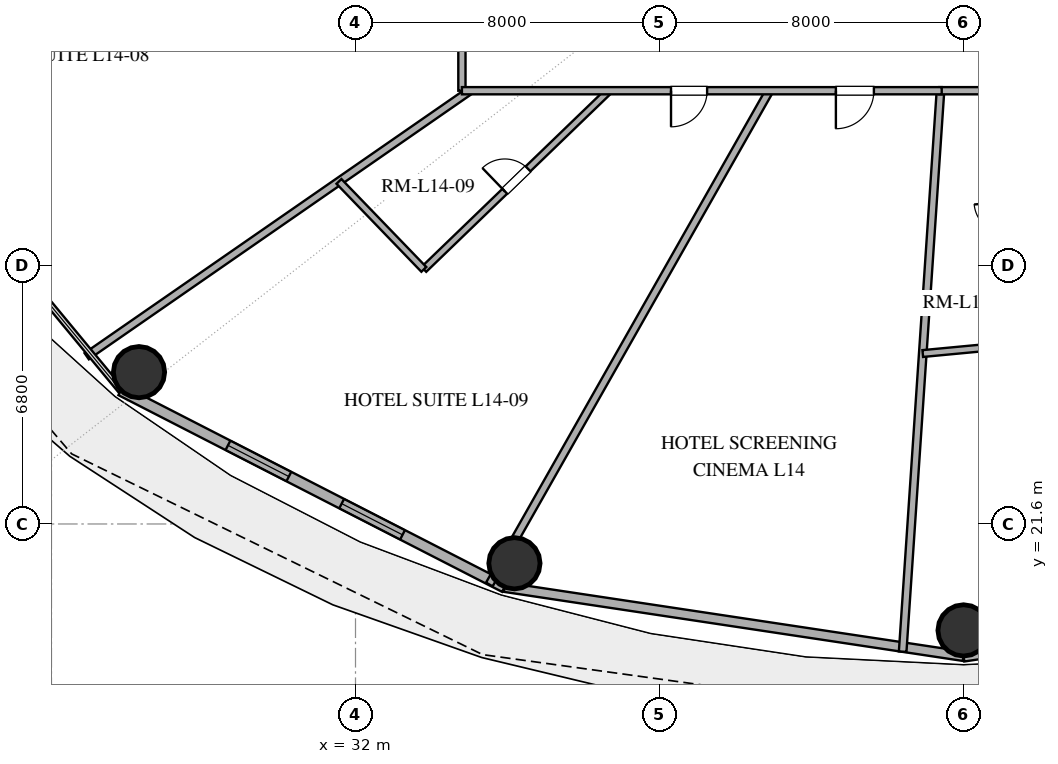
"""IFC4 building model, lengths in metres.
Left out: names, types, materials, properties, quantities, classifications, styles, units other than length and angle.
Written with IfcOpenShell. Run it as: python <this file> out.ifc"""

import sys

from ifc_helpers import new_model, si_unit, direction, frame, frame_2d, origin, origin_2d, place, context, subcontext, project, spatial, rectangle, hollow_circle, extrude, element, fill, save


model = new_model("IFC4")
c1 = context("Model", 3, precision=1e-05, world=origin(), true_north=direction((0.0, 1.0)))
c2 = subcontext(c1, "Body", "Model", "MODEL_VIEW")
j1 = project(units=[si_unit("LENGTHUNIT", "METRE"), si_unit("PLANEANGLEUNIT", "RADIAN")], contexts=[c1])
p1 = place(None, origin())
s1 = spatial("IfcSite", under=j1, at=p1, CompositionType="ELEMENT")
p2 = place(p1, origin())
s2 = spatial("IfcBuilding", under=s1, at=p2, CompositionType="ELEMENT")
p3 = place(p2, frame((0.0, 0.0, 60.6)))
s3 = spatial("IfcBuildingStorey", under=s2, at=p3, CompositionType="ELEMENT", Elevation=60.6)
for number, where, z_axis, x_axis in (
    (1, (26.303, 25.595, 0.0), (0.0, 0.0, 1.0), (1.0, 0.0, 0.0)),
    (2, (36.182, 20.566, 0.0), (0.0, 0.0, 1.0), (1.0, 0.0, 0.0)),
    (3, (48.0, 18.8, 0.0), (0.0, 0.0, 1.0), (1.0, 0.0, 0.0)),
):
    element("IfcColumn", number, at=place(p3, frame(where, z_axis=z_axis, x_axis=x_axis)), inside=s3, PredefinedType="COLUMN", context=c2, shape_type="SweptSolid", body=[
        extrude(hollow_circle(Radius=0.675, WallThickness=0.036, at=origin_2d()), origin(), (0.0, 0.0, 1.0), 3.38),
    ])
p4 = place(p3, frame((25.826, 25.114, 0.0), z_axis=(0.0, 0.0, 1.0), x_axis=(0.889853976658, -0.456245438581, 0.0)))
e4 = element("IfcWall", 4, at=p4, inside=s3, PredefinedType="SOLIDWALL", context=c2, shape_type="SweptSolid", body=[
    extrude(rectangle(XDim=11.346, YDim=0.28, at=frame_2d((5.673, 0.0))), origin(), (0.0, 0.0, 1.0), 3.38),
])
p5 = place(p4, frame((3.167, 0.0, 0.85)))
e5 = element("IfcOpeningElement", 5, at=p5, cuts=e4, PredefinedType="OPENING", context=c2, shape_type="SweptSolid", body=[
    extrude(rectangle(XDim=1.8, YDim=2.2, at=frame_2d((0.9, 1.1))), frame((0.0, 0.15, 0.0), z_axis=(0.0, -1.0, 0.0), x_axis=(1.0, 0.0, 0.0)), (0.0, 0.0, 1.0), 0.3),
])
p6 = place(p4, frame((6.529, 0.0, 0.85)))
e6 = element("IfcOpeningElement", 6, at=p6, cuts=e4, PredefinedType="OPENING", context=c2, shape_type="SweptSolid", body=[
    extrude(rectangle(XDim=1.8, YDim=2.2, at=frame_2d((0.9, 1.1))), frame((0.0, 0.15, 0.0), z_axis=(0.0, -1.0, 0.0), x_axis=(1.0, 0.0, 0.0)), (0.0, 0.0, 1.0), 0.3),
])
p7 = place(p3, frame((35.922, 19.938, 0.0), z_axis=(0.0, 0.0, 1.0), x_axis=(0.988864835849, -0.148816452121, 0.0)))
e7 = element("IfcWall", 7, at=p7, inside=s3, PredefinedType="SOLIDWALL", context=c2, shape_type="SweptSolid", body=[
    extrude(rectangle(XDim=12.214, YDim=0.25, at=frame_2d((6.107, 0.0))), origin(), (0.0, 0.0, 1.0), 3.38),
])
p8 = place(p3, frame((48.0, 18.12, 0.0), z_axis=(0.0, 0.0, 1.0), x_axis=(0.988864835849, 0.148816452121, 0.0)))
e8 = element("IfcWall", 8, at=p8, inside=s3, PredefinedType="SOLIDWALL", context=c2, shape_type="SweptSolid", body=[
    extrude(rectangle(XDim=12.214, YDim=0.28, at=frame_2d((6.107, 0.0))), origin(), (0.0, 0.0, 1.0), 3.38),
])
p9 = place(p8, frame((2.972, 0.0, 0.85)))
e9 = element("IfcOpeningElement", 9, at=p9, cuts=e8, PredefinedType="OPENING", context=c2, shape_type="SweptSolid", body=[
    extrude(rectangle(XDim=1.5, YDim=2.0, at=frame_2d((0.75, 1.0))), frame((0.0, 0.15, 0.0), z_axis=(0.0, -1.0, 0.0), x_axis=(1.0, 0.0, 0.0)), (0.0, 0.0, 1.0), 0.3),
])
p10 = place(p8, frame((5.942, 0.0, 0.85)))
e10 = element("IfcOpeningElement", 10, at=p10, cuts=e8, PredefinedType="OPENING", context=c2, shape_type="SweptSolid", body=[
    extrude(rectangle(XDim=1.5, YDim=2.0, at=frame_2d((0.75, 1.0))), frame((0.0, 0.15, 0.0), z_axis=(0.0, -1.0, 0.0), x_axis=(1.0, 0.0, 0.0)), (0.0, 0.0, 1.0), 0.3),
])
p11 = place(p8, frame((9.52, 0.0, 0.0)))
e11 = element("IfcOpeningElement", 11, at=p11, cuts=e8, PredefinedType="OPENING", context=c2, shape_type="SweptSolid", body=[
    extrude(rectangle(XDim=1.1, YDim=2.25, at=frame_2d((0.55, 1.125))), frame((0.0, 0.15, 0.0), z_axis=(0.0, -1.0, 0.0), x_axis=(1.0, 0.0, 0.0)), (0.0, 0.0, 1.0), 0.3),
])
p12 = place(p3, frame((42.893, 33.0, 0.0), z_axis=(0.0, 0.0, 1.0), x_axis=(-0.493512300658, -0.869738816599, 0.0)))
e12 = element("IfcWall", 12, at=p12, inside=s3, PredefinedType="PARTITIONING", context=c2, shape_type="SweptSolid", body=[
    extrude(rectangle(XDim=14.938, YDim=0.2, at=frame_2d((7.469, 0.0))), origin(), (0.0, 0.0, 1.0), 2.74),
])
p13 = place(p3, frame((35.009, 33.0, 0.0), z_axis=(0.0, 0.0, 1.0), x_axis=(-0.821999402566, -0.569488351226, 0.0)))
e13 = element("IfcWall", 13, at=p13, inside=s3, PredefinedType="PARTITIONING", context=c2, shape_type="SweptSolid", body=[
    extrude(rectangle(XDim=12.266, YDim=0.2, at=frame_2d((6.133, 0.0))), origin(), (0.0, 0.0, 1.0), 2.74),
])
p14 = place(p3, frame((47.393, 33.0, 0.0), z_axis=(0.0, 0.0, 1.0), x_axis=(-0.067284649742, -0.997733820169, 0.0)))
e14 = element("IfcWall", 14, at=p14, inside=s3, PredefinedType="PARTITIONING", context=c2, shape_type="SweptSolid", body=[
    extrude(rectangle(XDim=14.793, YDim=0.2, at=frame_2d((7.396, 0.0))), origin(), (0.0, 0.0, 1.0), 2.74),
])
p15 = place(p3, frame((33.798, 28.299, 0.0), z_axis=(0.0, 0.0, 1.0), x_axis=(0.719667322044, 0.69431905172, 0.0)))
e15 = element("IfcWall", 15, at=p15, inside=s3, PredefinedType="PLUMBINGWALL", context=c2, shape_type="SweptSolid", body=[
    extrude(rectangle(XDim=6.771, YDim=0.18, at=frame_2d((3.385, 0.0))), origin(), (0.0, 0.0, 1.0), 2.74),
])
p16 = place(p15, frame((2.96, 0.0, 0.0)))
e16 = element("IfcOpeningElement", 16, at=p16, cuts=e15, PredefinedType="OPENING", context=c2, shape_type="SweptSolid", body=[
    extrude(rectangle(XDim=0.85, YDim=2.1, at=frame_2d((0.425, 1.05))), frame((0.0, 0.1, 0.0), z_axis=(0.0, -1.0, 0.0), x_axis=(1.0, 0.0, 0.0)), (0.0, 0.0, 1.0), 0.2),
])
p17 = place(p3, frame((61.2, 33.0, 0.0), z_axis=(0.0, 0.0, 1.0), x_axis=(-1.0, 0.0, 0.0)))
e17 = element("IfcWall", 17, at=p17, inside=s3, PredefinedType="PARTITIONING", context=c2, shape_type="SweptSolid", body=[
    extrude(rectangle(XDim=13.839, YDim=0.19, at=frame_2d((6.919, 0.0))), origin(), (0.0, 0.0, 1.0), 2.74),
])
p18 = place(p17, frame((5.965, 0.0, 0.0)))
e18 = element("IfcOpeningElement", 18, at=p18, cuts=e17, PredefinedType="OPENING", context=c2, shape_type="SweptSolid", body=[
    extrude(rectangle(XDim=1.0, YDim=2.2, at=frame_2d((0.5, 1.1))), frame((0.0, 0.105, 0.0), z_axis=(0.0, -1.0, 0.0), x_axis=(1.0, 0.0, 0.0)), (0.0, 0.0, 1.0), 0.21),
])
p19 = place(p17, frame((10.493, 0.0, 0.0)))
e19 = element("IfcOpeningElement", 19, at=p19, cuts=e17, PredefinedType="OPENING", context=c2, shape_type="SweptSolid", body=[
    extrude(rectangle(XDim=0.95, YDim=2.15, at=frame_2d((0.475, 1.075))), frame((0.0, 0.105, 0.0), z_axis=(0.0, -1.0, 0.0), x_axis=(1.0, 0.0, 0.0)), (0.0, 0.0, 1.0), 0.21),
])
p20 = place(p3, frame((34.8, 33.0, 0.0), z_axis=(0.0, 0.0, 1.0), x_axis=(0.0, 1.0, 0.0)))
e20 = element("IfcWall", 20, at=p20, inside=s3, PredefinedType="PARTITIONING", context=c2, shape_type="SweptSolid", body=[
    extrude(rectangle(XDim=6.942, YDim=0.19, at=frame_2d((3.471, 0.0))), origin(), (0.0, 0.0, 1.0), 2.74),
])
p21 = place(p20, frame((1.865, 0.0, 0.0)))
e21 = element("IfcOpeningElement", 21, at=p21, cuts=e20, PredefinedType="OPENING", context=c2, shape_type="SweptSolid", body=[
    extrude(rectangle(XDim=0.95, YDim=2.15, at=frame_2d((0.475, 1.075))), frame((0.0, 0.105, 0.0), z_axis=(0.0, -1.0, 0.0), x_axis=(1.0, 0.0, 0.0)), (0.0, 0.0, 1.0), 0.21),
])
p22 = place(p3, frame((47.425, 33.0, 0.0), z_axis=(0.0, 0.0, 1.0), x_axis=(-1.0, 0.0, 0.0)))
e22 = element("IfcWall", 22, at=p22, inside=s3, PredefinedType="PARTITIONING", context=c2, shape_type="SweptSolid", body=[
    extrude(rectangle(XDim=12.625, YDim=0.19, at=frame_2d((6.312, 0.0))), origin(), (0.0, 0.0, 1.0), 2.74),
])
p23 = place(p22, frame((1.784, 0.0, 0.0)))
e23 = element("IfcOpeningElement", 23, at=p23, cuts=e22, PredefinedType="OPENING", context=c2, shape_type="SweptSolid", body=[
    extrude(rectangle(XDim=1.0, YDim=2.2, at=frame_2d((0.5, 1.1))), frame((0.0, 0.105, 0.0), z_axis=(0.0, -1.0, 0.0), x_axis=(1.0, 0.0, 0.0)), (0.0, 0.0, 1.0), 0.21),
])
p24 = place(p22, frame((6.173, 0.0, 0.0)))
e24 = element("IfcOpeningElement", 24, at=p24, cuts=e22, PredefinedType="OPENING", context=c2, shape_type="SweptSolid", body=[
    extrude(rectangle(XDim=0.95, YDim=2.15, at=frame_2d((0.475, 1.075))), frame((0.0, 0.105, 0.0), z_axis=(0.0, -1.0, 0.0), x_axis=(1.0, 0.0, 0.0)), (0.0, 0.0, 1.0), 0.21),
])
p25 = place(p3, frame((31.565, 30.614, 0.0), z_axis=(0.0, 0.0, 1.0), x_axis=(0.694278833189, -0.719706121821, 0.0)))
e25 = element("IfcWall", 25, at=p25, inside=s3, PredefinedType="PLUMBINGWALL", context=c2, shape_type="SweptSolid", body=[
    extrude(rectangle(XDim=3.217, YDim=0.18, at=frame_2d((1.608, 0.0))), origin(), (0.0, 0.0, 1.0), 2.74),
])
p26 = place(p3, frame((46.927, 26.085, 0.0), z_axis=(0.0, 0.0, 1.0), x_axis=(0.995563205557, 0.09409518447, 0.0)))
e26 = element("IfcWall", 26, at=p26, inside=s3, PredefinedType="PLUMBINGWALL", context=c2, shape_type="SweptSolid", body=[
    extrude(rectangle(XDim=2.566, YDim=0.18, at=frame_2d((1.283, 0.0))), origin(), (0.0, 0.0, 1.0), 2.74),
])
p27 = place(p5, origin())
e27 = element("IfcWindow", 27, at=p27, inside=s3, PartitioningType="SINGLE_PANEL", PredefinedType="WINDOW", context=c2, shape_type="SweptSolid", body=[
    extrude(rectangle(XDim=1.8, YDim=2.2, at=frame_2d((0.9, 1.1))), frame((0.0, 0.03, 0.0), z_axis=(0.0, -1.0, 0.0), x_axis=(1.0, 0.0, 0.0)), (0.0, 0.0, 1.0), 0.06),
])
fill(e5, e27)
p28 = place(p6, origin())
e28 = element("IfcWindow", 28, at=p28, inside=s3, PartitioningType="SINGLE_PANEL", PredefinedType="WINDOW", context=c2, shape_type="SweptSolid", body=[
    extrude(rectangle(XDim=1.8, YDim=2.2, at=frame_2d((0.9, 1.1))), frame((0.0, 0.03, 0.0), z_axis=(0.0, -1.0, 0.0), x_axis=(1.0, 0.0, 0.0)), (0.0, 0.0, 1.0), 0.06),
])
fill(e6, e28)
p29 = place(p16, origin())
e29 = element("IfcDoor", 29, at=p29, inside=s3, OperationType="SINGLE_SWING_LEFT", PredefinedType="DOOR", context=c2, shape_type="SweptSolid", body=[
    extrude(rectangle(XDim=0.85, YDim=2.1, at=frame_2d((0.425, 1.05))), frame((0.0, 0.025, 0.0), z_axis=(0.0, -1.0, 0.0), x_axis=(1.0, 0.0, 0.0)), (0.0, 0.0, 1.0), 0.05),
])
fill(e16, e29)
p30 = place(p23, origin())
e30 = element("IfcDoor", 30, at=p30, inside=s3, OperationType="SINGLE_SWING_RIGHT", PredefinedType="DOOR", context=c2, shape_type="SweptSolid", body=[
    extrude(rectangle(XDim=1.0, YDim=2.2, at=frame_2d((0.5, 1.1))), frame((0.0, 0.025, 0.0), z_axis=(0.0, -1.0, 0.0), x_axis=(1.0, 0.0, 0.0)), (0.0, 0.0, 1.0), 0.05),
])
fill(e23, e30)
p31 = place(p24, origin())
e31 = element("IfcDoor", 31, at=p31, inside=s3, OperationType="SINGLE_SWING_RIGHT", PredefinedType="DOOR", context=c2, shape_type="SweptSolid", body=[
    extrude(rectangle(XDim=0.95, YDim=2.15, at=frame_2d((0.475, 1.075))), frame((0.0, 0.025, 0.0), z_axis=(0.0, -1.0, 0.0), x_axis=(1.0, 0.0, 0.0)), (0.0, 0.0, 1.0), 0.05),
])
fill(e24, e31)
save(model, sys.argv[1])
